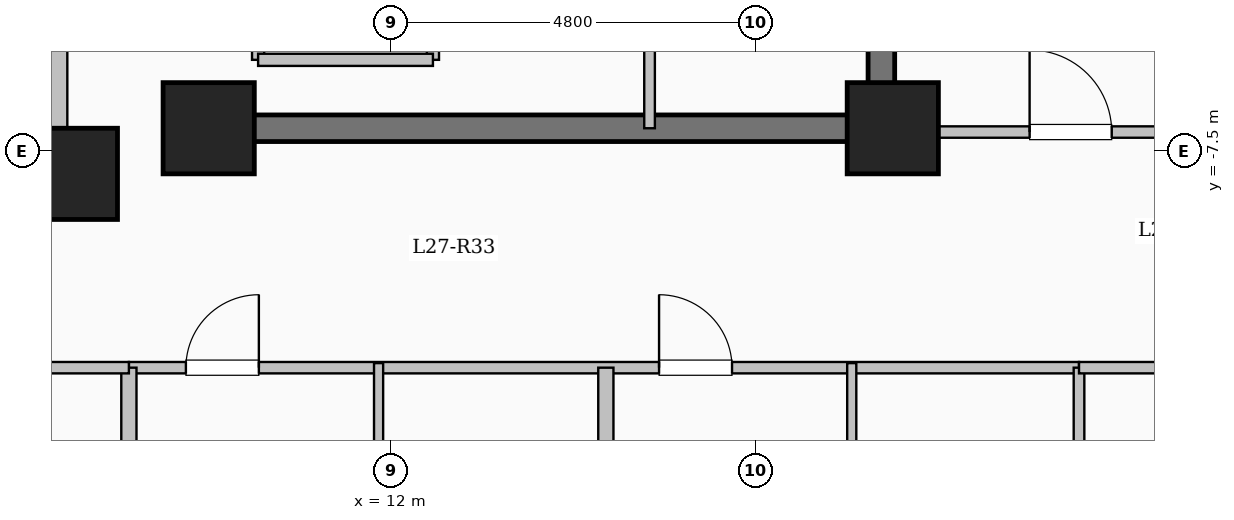
"""IFC4 building model, lengths in metres.
Left out: names, types, materials, properties, quantities, classifications, styles, units other than length and angle.
Written with IfcOpenShell. Run it as: python <this file> out.ifc"""

import sys

from ifc_helpers import new_model, si_unit, direction, frame, frame_2d, origin, origin_2d, place, context, subcontext, project, spatial, rectangle, extrude, element, fill, save


model = new_model("IFC4")
c1 = context("Model", 3, precision=1e-05, world=origin(), true_north=direction((0.0, 1.0)))
c2 = subcontext(c1, "Body", "Model", "MODEL_VIEW")
j1 = project(units=[si_unit("LENGTHUNIT", "METRE"), si_unit("PLANEANGLEUNIT", "RADIAN")], contexts=[c1])
p1 = place(None, origin())
s1 = spatial("IfcSite", under=j1, at=p1, CompositionType="ELEMENT")
p2 = place(p1, origin())
s2 = spatial("IfcBuilding", under=s1, at=p2, CompositionType="ELEMENT")
p3 = place(p2, frame((0.0, 0.0, 101.75)))
s3 = spatial("IfcBuildingStorey", under=s2, at=p3, CompositionType="ELEMENT", Elevation=101.75)
for number, where, z_axis, x_axis in (
    (1, (7.8, -7.8, 0.0), (0.0, 0.0, 1.0), (1.0, 0.0, 0.0)),
    (2, (9.6, -7.2, 0.0), (0.0, 0.0, 1.0), (1.0, 0.0, 0.0)),
    (3, (18.6, -7.2, 0.0), (0.0, 0.0, 1.0), (1.0, 0.0, 0.0)),
):
    element("IfcColumn", number, at=place(p3, frame(where, z_axis=z_axis, x_axis=x_axis)), inside=s3, PredefinedType="COLUMN", context=c2, shape_type="SweptSolid", body=[
        extrude(rectangle(XDim=1.2, YDim=1.2, at=origin_2d()), origin(), (0.0, 0.0, 1.0), 3.35),
    ])
p4 = place(p3, frame((-7.62, -7.62, 0.0), z_axis=(0.0, 0.0, 1.0), x_axis=(1.0, 0.0, 0.0)))
e4 = element("IfcWall", 4, at=p4, inside=s3, PredefinedType="SOLIDWALL", context=c2, shape_type="SweptSolid", body=[
    extrude(rectangle(XDim=15.24, YDim=0.24, at=frame_2d((7.62, 0.0))), origin(), (0.0, 0.0, 1.0), 3.1),
])
p5 = place(p4, frame((6.92, 0.0, 0.95)))
e5 = element("IfcOpeningElement", 5, at=p5, cuts=e4, PredefinedType="OPENING", context=c2, shape_type="SweptSolid", body=[
    extrude(rectangle(XDim=1.4, YDim=1.5, at=frame_2d((0.7, 0.75))), frame((0.0, 0.13, 0.0), z_axis=(0.0, -1.0, 0.0), x_axis=(1.0, 0.0, 0.0)), (0.0, 0.0, 1.0), 0.26),
])
p6 = place(p3, frame((7.62, -7.62, 0.0), z_axis=(0.0, 0.0, 1.0), x_axis=(0.0, 1.0, 0.0)))
e6 = element("IfcWall", 6, at=p6, inside=s3, PredefinedType="SOLIDWALL", context=c2, shape_type="SweptSolid", body=[
    extrude(rectangle(XDim=15.24, YDim=0.24, at=frame_2d((7.62, 0.0))), origin(), (0.0, 0.0, 1.0), 3.1),
])
p7 = place(p6, frame((6.92, 0.0, 0.95)))
e7 = element("IfcOpeningElement", 7, at=p7, cuts=e6, PredefinedType="OPENING", context=c2, shape_type="SweptSolid", body=[
    extrude(rectangle(XDim=1.4, YDim=1.5, at=frame_2d((0.7, 0.75))), frame((0.0, 0.13, 0.0), z_axis=(0.0, -1.0, 0.0), x_axis=(1.0, 0.0, 0.0)), (0.0, 0.0, 1.0), 0.26),
])
p8 = place(p3, frame((10.25, -6.3, 0.0), z_axis=(0.0, 0.0, 1.0), x_axis=(0.0, 1.0, 0.0)))
e8 = element("IfcWall", 8, at=p8, inside=s3, PredefinedType="SOLIDWALL", context=c2, shape_type="SweptSolid", body=[
    extrude(rectangle(XDim=2.6, YDim=0.16, at=frame_2d((1.3, 0.0))), origin(), (0.0, 0.0, 1.0), 3.1),
])
p9 = place(p8, frame((0.75, 0.0, 0.0)))
e9 = element("IfcOpeningElement", 9, at=p9, cuts=e8, PredefinedType="OPENING", context=c2, shape_type="SweptSolid", body=[
    extrude(rectangle(XDim=1.1, YDim=2.15, at=frame_2d((0.55, 1.075))), frame((0.0, 0.09, 0.0), z_axis=(0.0, -1.0, 0.0), x_axis=(1.0, 0.0, 0.0)), (0.0, 0.0, 1.0), 0.18),
])
p10 = place(p3, frame((12.55, -6.3, 0.0), z_axis=(0.0, 0.0, 1.0), x_axis=(0.0, 1.0, 0.0)))
e10 = element("IfcWall", 10, at=p10, inside=s3, PredefinedType="SOLIDWALL", context=c2, shape_type="SweptSolid", body=[
    extrude(rectangle(XDim=2.6, YDim=0.16, at=frame_2d((1.3, 0.0))), origin(), (0.0, 0.0, 1.0), 3.1),
])
p11 = place(p3, frame((10.25, -6.3, 0.0), z_axis=(0.0, 0.0, 1.0), x_axis=(1.0, 0.0, 0.0)))
e11 = element("IfcWall", 11, at=p11, inside=s3, PredefinedType="SOLIDWALL", context=c2, shape_type="SweptSolid", body=[
    extrude(rectangle(XDim=2.3, YDim=0.16, at=frame_2d((1.15, 0.0))), origin(), (0.0, 0.0, 1.0), 3.1),
])
p12 = place(p3, frame((18.45, -7.375, 0.0), z_axis=(0.0, 0.0, 1.0), x_axis=(0.0, 1.0, 0.0)))
e12 = element("IfcWall", 12, at=p12, inside=s3, PredefinedType="SHEAR", context=c2, shape_type="SweptSolid", body=[
    extrude(rectangle(XDim=14.05, YDim=0.35, at=frame_2d((7.025, 0.0))), origin(), (0.0, 0.0, 1.0), 3.35),
])
p13 = place(p3, frame((10.075, -7.2, 0.0), z_axis=(0.0, 0.0, 1.0), x_axis=(1.0, 0.0, 0.0)))
e13 = element("IfcWall", 13, at=p13, inside=s3, PredefinedType="SHEAR", context=c2, shape_type="SweptSolid", body=[
    extrude(rectangle(XDim=8.55, YDim=0.35, at=frame_2d((4.275, 0.0))), origin(), (0.0, 0.0, 1.0), 3.35),
])
p14 = place(p3, frame((15.4, -7.2, 0.0), z_axis=(0.0, 0.0, 1.0), x_axis=(0.0, 1.0, 0.0)))
e14 = element("IfcWall", 14, at=p14, inside=s3, PredefinedType="PARTITIONING", context=c2, shape_type="SweptSolid", body=[
    extrude(rectangle(XDim=10.45, YDim=0.14, at=frame_2d((5.225, 0.0))), origin(), (0.0, 0.0, 1.0), 3.1),
])
p15 = place(p14, frame((9.25, 0.0, 0.0)))
e15 = element("IfcOpeningElement", 15, at=p15, cuts=e14, PredefinedType="OPENING", context=c2, shape_type="SweptSolid", body=[
    extrude(rectangle(XDim=0.9, YDim=2.08, at=frame_2d((0.45, 1.04))), frame((0.0, 0.08, 0.0), z_axis=(0.0, -1.0, 0.0), x_axis=(1.0, 0.0, 0.0)), (0.0, 0.0, 1.0), 0.16),
])
p16 = place(p3, frame((8.55, -10.35, 0.0), z_axis=(0.0, 0.0, 1.0), x_axis=(1.0, 0.0, 0.0)))
e16 = element("IfcWall", 16, at=p16, inside=s3, PredefinedType="PARTITIONING", context=c2, shape_type="SweptSolid", body=[
    extrude(rectangle(XDim=12.5, YDim=0.15, at=frame_2d((6.25, 0.0))), origin(), (0.0, 0.0, 1.0), 3.1),
])
p17 = place(p16, frame((0.75, 0.0, 0.0)))
e17 = element("IfcOpeningElement", 17, at=p17, cuts=e16, PredefinedType="OPENING", context=c2, shape_type="SweptSolid", body=[
    extrude(rectangle(XDim=0.96, YDim=2.15, at=frame_2d((0.48, 1.075))), frame((0.0, 0.085, 0.0), z_axis=(0.0, -1.0, 0.0), x_axis=(1.0, 0.0, 0.0)), (0.0, 0.0, 1.0), 0.17),
])
p18 = place(p16, frame((6.975, 0.0, 0.0)))
e18 = element("IfcOpeningElement", 18, at=p18, cuts=e16, PredefinedType="OPENING", context=c2, shape_type="SweptSolid", body=[
    extrude(rectangle(XDim=0.96, YDim=2.15, at=frame_2d((0.48, 1.075))), frame((0.0, 0.085, 0.0), z_axis=(0.0, -1.0, 0.0), x_axis=(1.0, 0.0, 0.0)), (0.0, 0.0, 1.0), 0.17),
])
p19 = place(p3, frame((14.825, -22.1, 0.0), z_axis=(0.0, 0.0, 1.0), x_axis=(0.0, 1.0, 0.0)))
e19 = element("IfcWall", 19, at=p19, inside=s3, PredefinedType="SOLIDWALL", context=c2, shape_type="SweptSolid", body=[
    extrude(rectangle(XDim=11.75, YDim=0.2, at=frame_2d((5.875, 0.0))), origin(), (0.0, 0.0, 1.0), 2.435),
])
p20 = place(p3, frame((11.835, -13.51, 0.0), z_axis=(0.0, 0.0, 1.0), x_axis=(0.0, 1.0, 0.0)))
e20 = element("IfcWall", 20, at=p20, inside=s3, PredefinedType="PARTITIONING", context=c2, shape_type="SweptSolid", body=[
    extrude(rectangle(XDim=3.22, YDim=0.12, at=frame_2d((1.61, 0.0))), origin(), (0.0, 0.0, 1.0), 3.1),
])
p21 = place(p20, frame((1.14, 0.0, 0.0)))
e21 = element("IfcOpeningElement", 21, at=p21, cuts=e20, PredefinedType="OPENING", context=c2, shape_type="SweptSolid", body=[
    extrude(rectangle(XDim=0.88, YDim=2.1, at=frame_2d((0.44, 1.05))), frame((0.0, 0.07, 0.0), z_axis=(0.0, -1.0, 0.0), x_axis=(1.0, 0.0, 0.0)), (0.0, 0.0, 1.0), 0.14),
])
p22 = place(p3, frame((18.06, -13.51, 0.0), z_axis=(0.0, 0.0, 1.0), x_axis=(0.0, 1.0, 0.0)))
e22 = element("IfcWall", 22, at=p22, inside=s3, PredefinedType="PARTITIONING", context=c2, shape_type="SweptSolid", body=[
    extrude(rectangle(XDim=3.22, YDim=0.12, at=frame_2d((1.61, 0.0))), origin(), (0.0, 0.0, 1.0), 3.1),
])
p23 = place(p22, frame((1.14, 0.0, 0.0)))
e23 = element("IfcOpeningElement", 23, at=p23, cuts=e22, PredefinedType="OPENING", context=c2, shape_type="SweptSolid", body=[
    extrude(rectangle(XDim=0.88, YDim=2.1, at=frame_2d((0.44, 1.05))), frame((0.0, 0.07, 0.0), z_axis=(0.0, -1.0, 0.0), x_axis=(1.0, 0.0, 0.0)), (0.0, 0.0, 1.0), 0.14),
])
p24 = place(p3, frame((8.55, -22.704, 0.0), z_axis=(0.0, 0.0, 1.0), x_axis=(0.0, 1.0, 0.0)))
e24 = element("IfcWall", 24, at=p24, inside=s3, PredefinedType="SOLIDWALL", context=c2, shape_type="SweptSolid", body=[
    extrude(rectangle(XDim=12.354, YDim=0.2, at=frame_2d((6.177, 0.0))), origin(), (0.0, 0.0, 1.0), 3.1),
])
p25 = place(p3, frame((-8.55, -10.35, 0.0), z_axis=(0.0, 0.0, 1.0), x_axis=(1.0, 0.0, 0.0)))
e25 = element("IfcWall", 25, at=p25, inside=s3, PredefinedType="PARTITIONING", context=c2, shape_type="SweptSolid", body=[
    extrude(rectangle(XDim=17.1, YDim=0.15, at=frame_2d((8.55, 0.0))), origin(), (0.0, 0.0, 1.0), 3.1),
])
p26 = place(p25, frame((1.6, 0.0, 0.0)))
e26 = element("IfcOpeningElement", 26, at=p26, cuts=e25, PredefinedType="OPENING", context=c2, shape_type="SweptSolid", body=[
    extrude(rectangle(XDim=0.95, YDim=2.15, at=frame_2d((0.475, 1.075))), frame((0.0, 0.085, 0.0), z_axis=(0.0, -1.0, 0.0), x_axis=(1.0, 0.0, 0.0)), (0.0, 0.0, 1.0), 0.17),
])
p27 = place(p25, frame((10.5, 0.0, 0.0)))
e27 = element("IfcOpeningElement", 27, at=p27, cuts=e25, PredefinedType="OPENING", context=c2, shape_type="SweptSolid", body=[
    extrude(rectangle(XDim=0.95, YDim=2.15, at=frame_2d((0.475, 1.075))), frame((0.0, 0.085, 0.0), z_axis=(0.0, -1.0, 0.0), x_axis=(1.0, 0.0, 0.0)), (0.0, 0.0, 1.0), 0.17),
])
p28 = place(p3, frame((18.45, -7.25, 0.0), z_axis=(0.0, 0.0, 1.0), x_axis=(1.0, 0.0, 0.0)))
e28 = element("IfcWall", 28, at=p28, inside=s3, PredefinedType="PARTITIONING", context=c2, shape_type="SweptSolid", body=[
    extrude(rectangle(XDim=8.43, YDim=0.15, at=frame_2d((4.215, 0.0))), origin(), (0.0, 0.0, 1.0), 3.1),
])
p29 = place(p28, frame((1.95, 0.0, 0.0)))
e29 = element("IfcOpeningElement", 29, at=p29, cuts=e28, PredefinedType="OPENING", context=c2, shape_type="SweptSolid", body=[
    extrude(rectangle(XDim=1.08, YDim=2.15, at=frame_2d((0.54, 1.075))), frame((0.0, 0.085, 0.0), z_axis=(0.0, -1.0, 0.0), x_axis=(1.0, 0.0, 0.0)), (0.0, 0.0, 1.0), 0.17),
])
p30 = place(p3, frame((21.05, -17.85, 0.0), z_axis=(0.0, 0.0, 1.0), x_axis=(0.0, 1.0, 0.0)))
e30 = element("IfcWall", 30, at=p30, inside=s3, PredefinedType="PARTITIONING", context=c2, shape_type="SweptSolid", body=[
    extrude(rectangle(XDim=7.5, YDim=0.14, at=frame_2d((3.75, 0.0))), origin(), (0.0, 0.0, 1.0), 3.1),
])
p31 = place(p3, frame((21.05, -10.35, 0.0), z_axis=(0.0, 0.0, 1.0), x_axis=(1.0, 0.0, 0.0)))
e31 = element("IfcWall", 31, at=p31, inside=s3, PredefinedType="PARTITIONING", context=c2, shape_type="SweptSolid", body=[
    extrude(rectangle(XDim=5.83, YDim=0.15, at=frame_2d((2.915, 0.0))), origin(), (0.0, 0.0, 1.0), 3.1),
])
p32 = place(p31, frame((2.44, 0.0, 0.0)))
e32 = element("IfcOpeningElement", 32, at=p32, cuts=e31, PredefinedType="OPENING", context=c2, shape_type="SweptSolid", body=[
    extrude(rectangle(XDim=0.95, YDim=2.15, at=frame_2d((0.475, 1.075))), frame((0.0, 0.085, 0.0), z_axis=(0.0, -1.0, 0.0), x_axis=(1.0, 0.0, 0.0)), (0.0, 0.0, 1.0), 0.17),
])
p33 = place(p17, origin())
e33 = element("IfcDoor", 33, at=p33, inside=s3, OperationType="SINGLE_SWING_RIGHT", PredefinedType="DOOR", context=c2, shape_type="SweptSolid", body=[
    extrude(rectangle(XDim=0.96, YDim=2.15, at=frame_2d((0.48, 1.075))), frame((0.0, 0.025, 0.0), z_axis=(0.0, -1.0, 0.0), x_axis=(1.0, 0.0, 0.0)), (0.0, 0.0, 1.0), 0.05),
])
fill(e17, e33)
p34 = place(p18, origin())
e34 = element("IfcDoor", 34, at=p34, inside=s3, OperationType="SINGLE_SWING_LEFT", PredefinedType="DOOR", context=c2, shape_type="SweptSolid", body=[
    extrude(rectangle(XDim=0.96, YDim=2.15, at=frame_2d((0.48, 1.075))), frame((0.0, 0.025, 0.0), z_axis=(0.0, -1.0, 0.0), x_axis=(1.0, 0.0, 0.0)), (0.0, 0.0, 1.0), 0.05),
])
fill(e18, e34)
p35 = place(p29, origin())
e35 = element("IfcDoor", 35, at=p35, inside=s3, OperationType="SINGLE_SWING_LEFT", PredefinedType="DOOR", context=c2, shape_type="SweptSolid", body=[
    extrude(rectangle(XDim=1.08, YDim=2.15, at=frame_2d((0.54, 1.075))), frame((0.0, 0.025, 0.0), z_axis=(0.0, -1.0, 0.0), x_axis=(1.0, 0.0, 0.0)), (0.0, 0.0, 1.0), 0.05),
])
fill(e29, e35)
save(model, sys.argv[1])
